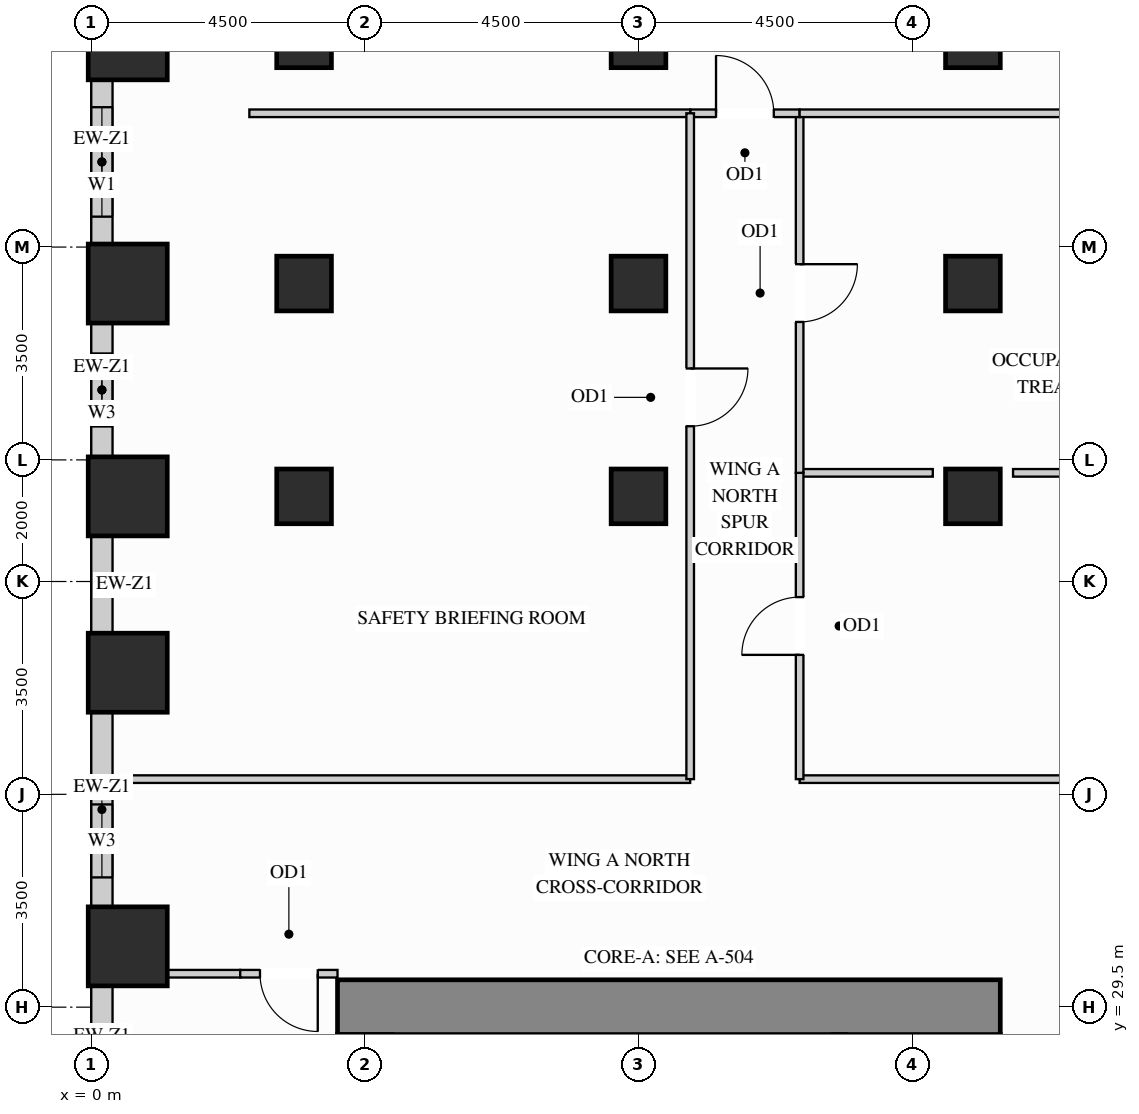
"""IFC4 building model, lengths in metres.
Left out: names, types, materials, properties, quantities, classifications, styles, units other than length and angle.
Written with IfcOpenShell. Run it as: python <this file> out.ifc"""

import sys

from ifc_helpers import new_model, si_unit, direction, frame, frame_2d, origin, origin_2d, place, context, subcontext, project, spatial, rectangle, extrude, source, transform, mapped, element, fill, save


model = new_model("IFC4")
c1 = context("Model", 3, precision=1e-05, world=origin(), true_north=direction((0.0, 1.0)))
c2 = subcontext(c1, "Body", "Model", "MODEL_VIEW")
j1 = project(units=[si_unit("LENGTHUNIT", "METRE"), si_unit("PLANEANGLEUNIT", "RADIAN")], contexts=[c1])
p1 = place(None, origin())
s1 = spatial("IfcSite", under=j1, at=p1, CompositionType="ELEMENT")
p2 = place(p1, origin())
s2 = spatial("IfcBuilding", under=s1, at=p2, CompositionType="ELEMENT")
p3 = place(p2, frame((0.0, 0.0, 33.3)))
s3 = spatial("IfcBuildingStorey", under=s2, at=p3, CompositionType="ELEMENT", Elevation=33.3)
m1 = source(origin(), c2, "Body", "SweptSolid", [
    extrude(rectangle(XDim=0.9, YDim=0.9, at=origin_2d()), origin(), (0.0, 0.0, 1.0), 3.38),
])
for number, where, z_axis, x_axis in (
    (1, (14.5, 37.9, 0.0), (0.0, 0.0, 1.0), (1.0, 0.0, 0.0)),
    (2, (14.5, 41.4, 0.0), (0.0, 0.0, 1.0), (1.0, 0.0, 0.0)),
    (3, (14.5, 45.4, 0.0), (0.0, 0.0, 1.0), (1.0, 0.0, 0.0)),
    (4, (3.5, 37.9, 0.0), (0.0, 0.0, 1.0), (1.0, 0.0, 0.0)),
    (5, (3.5, 41.4, 0.0), (0.0, 0.0, 1.0), (1.0, 0.0, 0.0)),
    (6, (3.5, 45.4, 0.0), (0.0, 0.0, 1.0), (1.0, 0.0, 0.0)),
    (7, (9.0, 37.9, 0.0), (0.0, 0.0, 1.0), (1.0, 0.0, 0.0)),
    (8, (9.0, 41.4, 0.0), (0.0, 0.0, 1.0), (1.0, 0.0, 0.0)),
    (9, (9.0, 45.4, 0.0), (0.0, 0.0, 1.0), (1.0, 0.0, 0.0)),
):
    element("IfcColumn", number, at=place(p3, frame(where, z_axis=z_axis, x_axis=x_axis)), inside=s3, PredefinedType="COLUMN", context=c2, shape_type="MappedRepresentation", body=[
        mapped(m1, transform((0.0, 0.0, 0.0), x_axis=(1.0, 0.0, 0.0), y_axis=(0.0, 1.0, 0.0), z_axis=(0.0, 0.0, 1.0))),
    ])
m2 = source(origin(), c2, "Body", "SweptSolid", [
    extrude(rectangle(XDim=1.3, YDim=1.3, at=origin_2d()), origin(), (0.0, 0.0, 1.0), 3.38),
])
for number, where, z_axis, x_axis in (
    (10, (0.6, 30.5, 0.0), (0.0, 0.0, 1.0), (1.0, 0.0, 0.0)),
    (11, (0.6, 35.0, 0.0), (0.0, 0.0, 1.0), (1.0, 0.0, 0.0)),
    (12, (0.6, 37.9, 0.0), (0.0, 0.0, 1.0), (1.0, 0.0, 0.0)),
    (13, (0.6, 41.4, 0.0), (0.0, 0.0, 1.0), (1.0, 0.0, 0.0)),
    (14, (0.6, 45.4, 0.0), (0.0, 0.0, 1.0), (1.0, 0.0, 0.0)),
):
    element("IfcColumn", number, at=place(p3, frame(where, z_axis=z_axis, x_axis=x_axis)), inside=s3, PredefinedType="COLUMN", context=c2, shape_type="MappedRepresentation", body=[
        mapped(m2, transform((0.0, 0.0, 0.0), x_axis=(1.0, 0.0, 0.0), y_axis=(0.0, 1.0, 0.0), z_axis=(0.0, 0.0, 1.0))),
    ])
m3 = source(origin(), c2, "Body", "SweptSolid", [
    extrude(rectangle(XDim=10.9, YDim=0.9, at=frame_2d((5.45, 0.0))), origin(), (0.0, 0.0, 1.0), 3.38),
])
p4 = place(p3, frame((4.05, 29.5, 0.0), z_axis=(0.0, 0.0, 1.0), x_axis=(1.0, 0.0, 0.0)))
e15 = element("IfcWall", 15, at=p4, inside=s3, PredefinedType="SHEAR", context=c2, shape_type="MappedRepresentation", body=[
    mapped(m3, transform((0.0, 0.0, 0.0), x_axis=(1.0, 0.0, 0.0), y_axis=(0.0, 1.0, 0.0), z_axis=(0.0, 0.0, 1.0))),
])
p5 = place(p3, frame((0.175, 44.752, 0.0), z_axis=(0.0, 0.0, 1.0), x_axis=(0.0, -1.0, 0.0)))
e16 = element("IfcWall", 16, at=p5, inside=s3, PredefinedType="SOLIDWALL", context=c2, shape_type="SweptSolid", body=[
    extrude(rectangle(XDim=2.704, YDim=0.35, at=frame_2d((1.352, 0.0))), origin(), (0.0, 0.0, 1.0), 2.51),
])
p6 = place(p5, frame((0.452, 0.0, 0.78)))
e17 = element("IfcOpeningElement", 17, at=p6, cuts=e16, PredefinedType="OPENING", context=c2, shape_type="SweptSolid", body=[
    extrude(rectangle(XDim=1.8, YDim=1.55, at=frame_2d((0.9, 0.775))), frame((0.0, 0.185, 0.0), z_axis=(0.0, -1.0, 0.0), x_axis=(1.0, 0.0, 0.0)), (0.0, 0.0, 1.0), 0.37),
])
p7 = place(p3, frame((0.175, 40.752, 0.0), z_axis=(0.0, 0.0, 1.0), x_axis=(0.0, -1.0, 0.0)))
e18 = element("IfcWall", 18, at=p7, inside=s3, PredefinedType="SOLIDWALL", context=c2, shape_type="SweptSolid", body=[
    extrude(rectangle(XDim=2.204, YDim=0.35, at=frame_2d((1.102, 0.0))), origin(), (0.0, 0.0, 1.0), 2.51),
])
p8 = place(p7, frame((0.502, 0.0, 0.78)))
e19 = element("IfcOpeningElement", 19, at=p8, cuts=e18, PredefinedType="OPENING", context=c2, shape_type="SweptSolid", body=[
    extrude(rectangle(XDim=1.2, YDim=1.55, at=frame_2d((0.6, 0.775))), frame((0.0, 0.185, 0.0), z_axis=(0.0, -1.0, 0.0), x_axis=(1.0, 0.0, 0.0)), (0.0, 0.0, 1.0), 0.37),
])
m4 = source(origin(), c2, "Body", "SweptSolid", [
    extrude(rectangle(XDim=1.604, YDim=0.35, at=frame_2d((0.802, 0.0))), origin(), (0.0, 0.0, 1.0), 2.51),
])
p9 = place(p3, frame((0.175, 37.252, 0.0), z_axis=(0.0, 0.0, 1.0), x_axis=(0.0, -1.0, 0.0)))
e20 = element("IfcWall", 20, at=p9, inside=s3, PredefinedType="SOLIDWALL", context=c2, shape_type="MappedRepresentation", body=[
    mapped(m4, transform((0.0, 0.0, 0.0), x_axis=(1.0, 0.0, 0.0), y_axis=(0.0, 1.0, 0.0), z_axis=(0.0, 0.0, 1.0))),
])
p10 = place(p3, frame((0.175, 34.352, 0.0), z_axis=(0.0, 0.0, 1.0), x_axis=(0.0, -1.0, 0.0)))
e21 = element("IfcWall", 21, at=p10, inside=s3, PredefinedType="SOLIDWALL", context=c2, shape_type="SweptSolid", body=[
    extrude(rectangle(XDim=3.204, YDim=0.35, at=frame_2d((1.602, 0.0))), origin(), (0.0, 0.0, 1.0), 2.51),
])
p11 = place(p10, frame((1.518, 0.0, 0.78)))
e22 = element("IfcOpeningElement", 22, at=p11, cuts=e21, PredefinedType="OPENING", context=c2, shape_type="SweptSolid", body=[
    extrude(rectangle(XDim=1.2, YDim=1.55, at=frame_2d((0.6, 0.775))), frame((0.0, 0.185, 0.0), z_axis=(0.0, -1.0, 0.0), x_axis=(1.0, 0.0, 0.0)), (0.0, 0.0, 1.0), 0.37),
])
p12 = place(p3, frame((0.175, 29.852, 0.0), z_axis=(0.0, 0.0, 1.0), x_axis=(0.0, -1.0, 0.0)))
e23 = element("IfcWall", 23, at=p12, inside=s3, PredefinedType="SOLIDWALL", context=c2, shape_type="SweptSolid", body=[
    extrude(rectangle(XDim=2.404, YDim=0.35, at=frame_2d((1.202, 0.0))), origin(), (0.0, 0.0, 1.0), 2.51),
])
p13 = place(p12, frame((0.787, 0.0, 0.78)))
e24 = element("IfcOpeningElement", 24, at=p13, cuts=e23, PredefinedType="OPENING", context=c2, shape_type="SweptSolid", body=[
    extrude(rectangle(XDim=1.2, YDim=1.55, at=frame_2d((0.6, 0.775))), frame((0.0, 0.185, 0.0), z_axis=(0.0, -1.0, 0.0), x_axis=(1.0, 0.0, 0.0)), (0.0, 0.0, 1.0), 0.37),
])
m5 = source(origin(), c2, "Body", "SweptSolid", [
    extrude(rectangle(XDim=2.19, YDim=0.125, at=frame_2d((1.095, 0.0))), origin(), (0.0, 0.0, 1.0), 3.365),
])
p14 = place(p3, frame((11.65, 38.287, 0.0), z_axis=(0.0, 0.0, 1.0), x_axis=(1.0, 0.0, 0.0)))
e25 = element("IfcWall", 25, at=p14, inside=s3, PredefinedType="PARTITIONING", context=c2, shape_type="MappedRepresentation", body=[
    mapped(m5, transform((0.0, 0.0, 0.0), x_axis=(1.0, 0.0, 0.0), y_axis=(0.0, 1.0, 0.0), z_axis=(0.0, 0.0, 1.0))),
])
m6 = source(origin(), c2, "Body", "SweptSolid", [
    extrude(rectangle(XDim=3.18, YDim=0.125, at=frame_2d((1.59, 0.0))), origin(), (0.0, 0.0, 1.0), 3.365),
])
p15 = place(p3, frame((15.16, 38.287, 0.0), z_axis=(0.0, 0.0, 1.0), x_axis=(1.0, 0.0, 0.0)))
e26 = element("IfcWall", 26, at=p15, inside=s3, PredefinedType="PARTITIONING", context=c2, shape_type="MappedRepresentation", body=[
    mapped(m6, transform((0.0, 0.0, 0.0), x_axis=(1.0, 0.0, 0.0), y_axis=(0.0, 1.0, 0.0), z_axis=(0.0, 0.0, 1.0))),
])
m7 = source(origin(), c2, "Body", "SweptSolid", [
    extrude(rectangle(XDim=7.498, YDim=0.125, at=frame_2d((3.749, 0.0))), origin(), (0.0, 0.0, 1.0), 2.828),
])
p16 = place(p3, frame((11.65, 33.25, 0.0), z_axis=(0.0, 0.0, 1.0), x_axis=(1.0, 0.0, 0.0)))
e27 = element("IfcWall", 27, at=p16, inside=s3, PredefinedType="PARTITIONING", context=c2, shape_type="MappedRepresentation", body=[
    mapped(m7, transform((0.0, 0.0, 0.0), x_axis=(1.0, 0.0, 0.0), y_axis=(0.0, 1.0, 0.0), z_axis=(0.0, 0.0, 1.0))),
])
m8 = source(origin(), c2, "Body", "SweptSolid", [
    extrude(rectangle(XDim=9.498, YDim=0.125, at=frame_2d((4.749, 0.0))), origin(), (0.0, 0.0, 1.0), 2.828),
])
p17 = place(p3, frame((0.352, 33.25, 0.0), z_axis=(0.0, 0.0, 1.0), x_axis=(1.0, 0.0, 0.0)))
e28 = element("IfcWall", 28, at=p17, inside=s3, PredefinedType="PARTITIONING", context=c2, shape_type="MappedRepresentation", body=[
    mapped(m8, transform((0.0, 0.0, 0.0), x_axis=(1.0, 0.0, 0.0), y_axis=(0.0, 1.0, 0.0), z_axis=(0.0, 0.0, 1.0))),
])
m9 = source(origin(), c2, "Body", "SweptSolid", [
    extrude(rectangle(XDim=1.19, YDim=0.125, at=frame_2d((0.595, 0.0))), origin(), (0.0, 0.0, 1.0), 3.365),
])
p18 = place(p3, frame((1.26, 30.05, 0.0), z_axis=(0.0, 0.0, 1.0), x_axis=(1.0, 0.0, 0.0)))
e29 = element("IfcWall", 29, at=p18, inside=s3, PredefinedType="PARTITIONING", context=c2, shape_type="MappedRepresentation", body=[
    mapped(m9, transform((0.0, 0.0, 0.0), x_axis=(1.0, 0.0, 0.0), y_axis=(0.0, 1.0, 0.0), z_axis=(0.0, 0.0, 1.0))),
])
p19 = place(p3, frame((2.45, 30.05, 0.0), z_axis=(0.0, 0.0, 1.0), x_axis=(1.0, 0.0, 0.0)))
e30 = element("IfcWall", 30, at=p19, inside=s3, PredefinedType="PARTITIONING", context=c2, shape_type="SweptSolid", body=[
    extrude(rectangle(XDim=1.6, YDim=0.125, at=frame_2d((0.8, 0.0))), origin(), (0.0, 0.0, 1.0), 3.365),
])
p20 = place(p19, frame((0.325, 0.0, 0.0)))
e31 = element("IfcOpeningElement", 31, at=p20, cuts=e30, PredefinedType="OPENING", context=c2, shape_type="SweptSolid", body=[
    extrude(rectangle(XDim=0.95, YDim=2.15, at=frame_2d((0.475, 1.075))), frame((0.0, 0.073, 0.0), z_axis=(0.0, -1.0, 0.0), x_axis=(1.0, 0.0, 0.0)), (0.0, 0.0, 1.0), 0.145),
])
p21 = place(p3, frame((11.65, 33.25, 0.0), z_axis=(0.0, 0.0, 1.0), x_axis=(0.0, 1.0, 0.0)))
e32 = element("IfcWall", 32, at=p21, inside=s3, PredefinedType="PARTITIONING", context=c2, shape_type="SweptSolid", body=[
    extrude(rectangle(XDim=5.037, YDim=0.125, at=frame_2d((2.519, 0.0))), origin(), (0.0, 0.0, 1.0), 3.365),
])
p22 = place(p21, frame((2.043, 0.0, 0.0)))
e33 = element("IfcOpeningElement", 33, at=p22, cuts=e32, PredefinedType="OPENING", context=c2, shape_type="SweptSolid", body=[
    extrude(rectangle(XDim=0.95, YDim=2.15, at=frame_2d((0.475, 1.075))), frame((0.0, 0.073, 0.0), z_axis=(0.0, -1.0, 0.0), x_axis=(1.0, 0.0, 0.0)), (0.0, 0.0, 1.0), 0.145),
])
p23 = place(p3, frame((11.65, 38.287, 0.0), z_axis=(0.0, 0.0, 1.0), x_axis=(0.0, 1.0, 0.0)))
e34 = element("IfcWall", 34, at=p23, inside=s3, PredefinedType="PARTITIONING", context=c2, shape_type="SweptSolid", body=[
    extrude(rectangle(XDim=5.913, YDim=0.125, at=frame_2d((2.957, 0.0))), origin(), (0.0, 0.0, 1.0), 3.365),
])
p24 = place(p23, frame((2.481, 0.0, 0.0)))
e35 = element("IfcOpeningElement", 35, at=p24, cuts=e34, PredefinedType="OPENING", context=c2, shape_type="SweptSolid", body=[
    extrude(rectangle(XDim=0.95, YDim=2.15, at=frame_2d((0.475, 1.075))), frame((0.0, 0.073, 0.0), z_axis=(0.0, -1.0, 0.0), x_axis=(1.0, 0.0, 0.0)), (0.0, 0.0, 1.0), 0.145),
])
p25 = place(p3, frame((9.85, 44.2, 0.0), z_axis=(0.0, 0.0, 1.0), x_axis=(1.0, 0.0, 0.0)))
e36 = element("IfcWall", 36, at=p25, inside=s3, PredefinedType="PARTITIONING", context=c2, shape_type="SweptSolid", body=[
    extrude(rectangle(XDim=1.8, YDim=0.125, at=frame_2d((0.9, 0.0))), origin(), (0.0, 0.0, 1.0), 3.365),
])
p26 = place(p25, frame((0.425, 0.0, 0.0)))
e37 = element("IfcOpeningElement", 37, at=p26, cuts=e36, PredefinedType="OPENING", context=c2, shape_type="SweptSolid", body=[
    extrude(rectangle(XDim=0.95, YDim=2.15, at=frame_2d((0.475, 1.075))), frame((0.0, 0.073, 0.0), z_axis=(0.0, -1.0, 0.0), x_axis=(1.0, 0.0, 0.0)), (0.0, 0.0, 1.0), 0.145),
])
m10 = source(origin(), c2, "Body", "SweptSolid", [
    extrude(rectangle(XDim=5.25, YDim=0.125, at=frame_2d((2.625, 0.0))), origin(), (0.0, 0.0, 1.0), 3.365),
])
p27 = place(p3, frame((11.65, 44.2, 0.0), z_axis=(0.0, 0.0, 1.0), x_axis=(1.0, 0.0, 0.0)))
e38 = element("IfcWall", 38, at=p27, inside=s3, PredefinedType="PARTITIONING", context=c2, shape_type="MappedRepresentation", body=[
    mapped(m10, transform((0.0, 0.0, 0.0), x_axis=(1.0, 0.0, 0.0), y_axis=(0.0, 1.0, 0.0), z_axis=(0.0, 0.0, 1.0))),
])
m11 = source(origin(), c2, "Body", "SweptSolid", [
    extrude(rectangle(XDim=7.25, YDim=0.125, at=frame_2d((3.625, 0.0))), origin(), (0.0, 0.0, 1.0), 3.365),
])
p28 = place(p3, frame((2.6, 44.2, 0.0), z_axis=(0.0, 0.0, 1.0), x_axis=(1.0, 0.0, 0.0)))
e39 = element("IfcWall", 39, at=p28, inside=s3, PredefinedType="PARTITIONING", context=c2, shape_type="MappedRepresentation", body=[
    mapped(m11, transform((0.0, 0.0, 0.0), x_axis=(1.0, 0.0, 0.0), y_axis=(0.0, 1.0, 0.0), z_axis=(0.0, 0.0, 1.0))),
])
p29 = place(p3, frame((9.85, 33.25, 0.0), z_axis=(0.0, 0.0, 1.0), x_axis=(0.0, 1.0, 0.0)))
e40 = element("IfcWall", 40, at=p29, inside=s3, PredefinedType="PARTITIONING", context=c2, shape_type="SweptSolid", body=[
    extrude(rectangle(XDim=10.95, YDim=0.125, at=frame_2d((5.475, 0.0))), origin(), (0.0, 0.0, 1.0), 3.365),
])
p30 = place(p29, frame((5.803, 0.0, 0.0)))
e41 = element("IfcOpeningElement", 41, at=p30, cuts=e40, PredefinedType="OPENING", context=c2, shape_type="SweptSolid", body=[
    extrude(rectangle(XDim=0.95, YDim=2.15, at=frame_2d((0.475, 1.075))), frame((0.0, 0.073, 0.0), z_axis=(0.0, -1.0, 0.0), x_axis=(1.0, 0.0, 0.0)), (0.0, 0.0, 1.0), 0.145),
])
m12 = source(origin(), c2, "Body", "SweptSolid", [
    extrude(rectangle(XDim=0.95, YDim=2.15, at=frame_2d((0.475, 1.075))), frame((0.0, 0.025, 0.0), z_axis=(0.0, -1.0, 0.0), x_axis=(1.0, 0.0, 0.0)), (0.0, 0.0, 1.0), 0.05),
])
p31 = place(p22, origin())
e42 = element("IfcDoor", 42, at=p31, inside=s3, OperationType="SINGLE_SWING_LEFT", PredefinedType="DOOR", context=c2, shape_type="MappedRepresentation", body=[
    mapped(m12, transform((0.0, 0.0, 0.0), x_axis=(1.0, 0.0, 0.0), y_axis=(0.0, 1.0, 0.0), z_axis=(0.0, 0.0, 1.0))),
])
fill(e33, e42)
p32 = place(p24, origin())
e43 = element("IfcDoor", 43, at=p32, inside=s3, OperationType="SINGLE_SWING_RIGHT", PredefinedType="DOOR", context=c2, shape_type="MappedRepresentation", body=[
    mapped(m12, transform((0.0, 0.0, 0.0), x_axis=(1.0, 0.0, 0.0), y_axis=(0.0, 1.0, 0.0), z_axis=(0.0, 0.0, 1.0))),
])
fill(e35, e43)
p33 = place(p26, origin())
e44 = element("IfcDoor", 44, at=p33, inside=s3, OperationType="SINGLE_SWING_LEFT", PredefinedType="DOOR", context=c2, shape_type="MappedRepresentation", body=[
    mapped(m12, transform((0.0, 0.0, 0.0), x_axis=(1.0, 0.0, 0.0), y_axis=(0.0, 1.0, 0.0), z_axis=(0.0, 0.0, 1.0))),
])
fill(e37, e44)
p34 = place(p30, origin())
e45 = element("IfcDoor", 45, at=p34, inside=s3, OperationType="SINGLE_SWING_RIGHT", PredefinedType="DOOR", context=c2, shape_type="MappedRepresentation", body=[
    mapped(m12, transform((0.0, 0.0, 0.0), x_axis=(1.0, 0.0, 0.0), y_axis=(0.0, 1.0, 0.0), z_axis=(0.0, 0.0, 1.0))),
])
fill(e41, e45)
p35 = place(p20, origin())
e46 = element("IfcDoor", 46, at=p35, inside=s3, OperationType="SINGLE_SWING_RIGHT", PredefinedType="DOOR", context=c2, shape_type="MappedRepresentation", body=[
    mapped(m12, transform((0.0, 0.0, 0.0), x_axis=(1.0, 0.0, 0.0), y_axis=(0.0, 1.0, 0.0), z_axis=(0.0, 0.0, 1.0))),
])
fill(e31, e46)
m13 = source(origin(), c2, "Body", "SweptSolid", [
    extrude(rectangle(XDim=1.8, YDim=1.55, at=frame_2d((0.9, 0.775))), frame((0.0, 0.03, 0.0), z_axis=(0.0, -1.0, 0.0), x_axis=(1.0, 0.0, 0.0)), (0.0, 0.0, 1.0), 0.06),
])
p36 = place(p6, origin())
e47 = element("IfcWindow", 47, at=p36, inside=s3, PartitioningType="SINGLE_PANEL", PredefinedType="WINDOW", context=c2, shape_type="MappedRepresentation", body=[
    mapped(m13, transform((0.0, 0.0, 0.0), x_axis=(1.0, 0.0, 0.0), y_axis=(0.0, 1.0, 0.0), z_axis=(0.0, 0.0, 1.0))),
])
fill(e17, e47)
m14 = source(origin(), c2, "Body", "SweptSolid", [
    extrude(rectangle(XDim=1.2, YDim=1.55, at=frame_2d((0.6, 0.775))), frame((0.0, 0.03, 0.0), z_axis=(0.0, -1.0, 0.0), x_axis=(1.0, 0.0, 0.0)), (0.0, 0.0, 1.0), 0.06),
])
p37 = place(p8, origin())
e48 = element("IfcWindow", 48, at=p37, inside=s3, PartitioningType="SINGLE_PANEL", PredefinedType="WINDOW", context=c2, shape_type="MappedRepresentation", body=[
    mapped(m14, transform((0.0, 0.0, 0.0), x_axis=(1.0, 0.0, 0.0), y_axis=(0.0, 1.0, 0.0), z_axis=(0.0, 0.0, 1.0))),
])
fill(e19, e48)
p38 = place(p11, origin())
e49 = element("IfcWindow", 49, at=p38, inside=s3, PartitioningType="SINGLE_PANEL", PredefinedType="WINDOW", context=c2, shape_type="MappedRepresentation", body=[
    mapped(m14, transform((0.0, 0.0, 0.0), x_axis=(1.0, 0.0, 0.0), y_axis=(0.0, 1.0, 0.0), z_axis=(0.0, 0.0, 1.0))),
])
fill(e22, e49)
p39 = place(p13, origin())
e50 = element("IfcWindow", 50, at=p39, inside=s3, PartitioningType="SINGLE_PANEL", PredefinedType="WINDOW", context=c2, shape_type="MappedRepresentation", body=[
    mapped(m14, transform((0.0, 0.0, 0.0), x_axis=(1.0, 0.0, 0.0), y_axis=(0.0, 1.0, 0.0), z_axis=(0.0, 0.0, 1.0))),
])
fill(e24, e50)
save(model, sys.argv[1])
